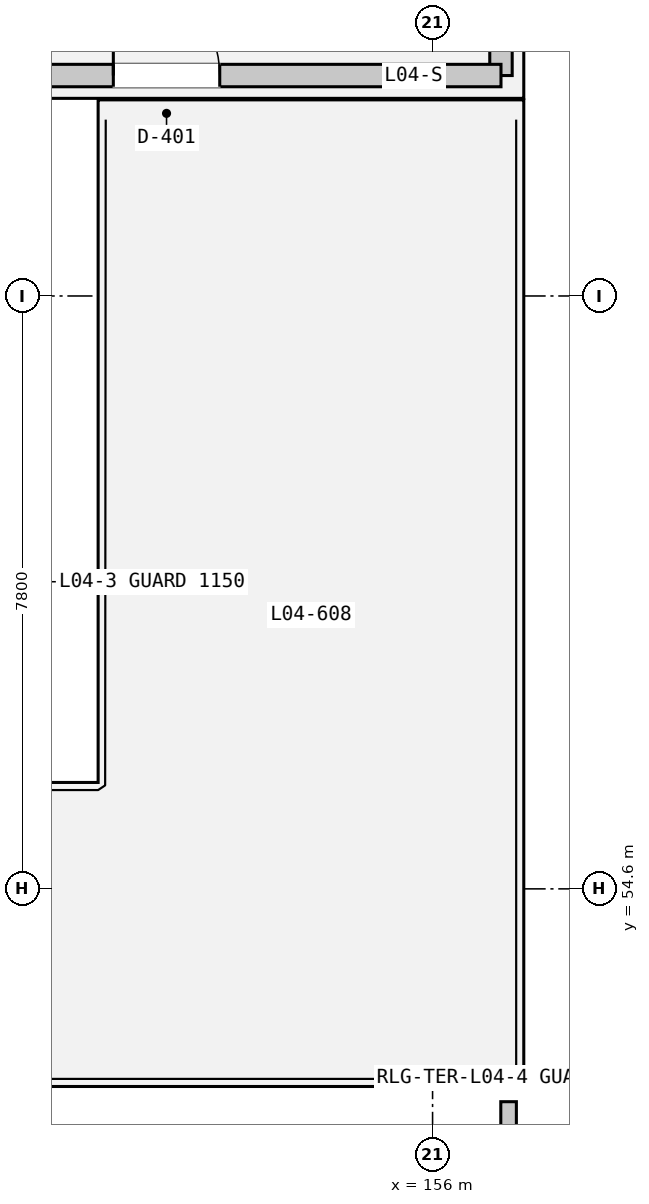
"""IFC4 building model, lengths in metres.
Left out: names, types, materials, properties, quantities, classifications, styles, units other than length and angle.
Written with IfcOpenShell. Run it as: python <this file> out.ifc"""

import sys

from ifc_helpers import new_model, si_unit, direction, frame, frame_2d, origin, place, context, subcontext, project, spatial, rectangle, extrude, element, fill, save


model = new_model("IFC4")
c1 = context("Model", 3, precision=1e-05, world=origin(), true_north=direction((0.0, 1.0)))
c2 = subcontext(c1, "Body", "Model", "MODEL_VIEW")
j1 = project(units=[si_unit("LENGTHUNIT", "METRE"), si_unit("PLANEANGLEUNIT", "RADIAN")], contexts=[c1])
p1 = place(None, origin())
s1 = spatial("IfcSite", under=j1, at=p1, CompositionType="ELEMENT")
p2 = place(p1, origin())
s2 = spatial("IfcBuilding", under=s1, at=p2, CompositionType="ELEMENT")
p3 = place(p2, frame((0.0, 0.0, 19.8)))
s3 = spatial("IfcBuildingStorey", under=s2, at=p3, CompositionType="ELEMENT", Elevation=19.8)
p4 = place(p3, frame((156.9, 65.3, 0.0), z_axis=(0.0, 0.0, 1.0), x_axis=(0.0, 1.0, 0.0)))
e1 = element("IfcWall", 1, at=p4, inside=s3, PredefinedType="SOLIDWALL", context=c2, shape_type="SweptSolid", body=[
    extrude(rectangle(XDim=35.8, YDim=0.295, at=frame_2d((17.9, 0.0))), origin(), (0.0, 0.0, 1.0), 3.57),
])
p5 = place(p4, frame((1.1, 0.0, 0.78)))
e2 = element("IfcOpeningElement", 2, at=p5, cuts=e1, PredefinedType="OPENING", context=c2, shape_type="SweptSolid", body=[
    extrude(rectangle(XDim=1.95, YDim=1.8, at=frame_2d((0.975, 0.9))), frame((0.0, 0.157, 0.0), z_axis=(0.0, -1.0, 0.0), x_axis=(1.0, 0.0, 0.0)), (0.0, 0.0, 1.0), 0.315),
])
p6 = place(p4, frame((5.0, 0.0, 0.78)))
e3 = element("IfcOpeningElement", 3, at=p6, cuts=e1, PredefinedType="OPENING", context=c2, shape_type="SweptSolid", body=[
    extrude(rectangle(XDim=1.95, YDim=1.8, at=frame_2d((0.975, 0.9))), frame((0.0, 0.157, 0.0), z_axis=(0.0, -1.0, 0.0), x_axis=(1.0, 0.0, 0.0)), (0.0, 0.0, 1.0), 0.315),
])
p7 = place(p4, frame((8.9, 0.0, 0.78)))
e4 = element("IfcOpeningElement", 4, at=p7, cuts=e1, PredefinedType="OPENING", context=c2, shape_type="SweptSolid", body=[
    extrude(rectangle(XDim=1.95, YDim=1.8, at=frame_2d((0.975, 0.9))), frame((0.0, 0.157, 0.0), z_axis=(0.0, -1.0, 0.0), x_axis=(1.0, 0.0, 0.0)), (0.0, 0.0, 1.0), 0.315),
])
p8 = place(p4, frame((12.8, 0.0, 0.78)))
e5 = element("IfcOpeningElement", 5, at=p8, cuts=e1, PredefinedType="OPENING", context=c2, shape_type="SweptSolid", body=[
    extrude(rectangle(XDim=1.95, YDim=1.8, at=frame_2d((0.975, 0.9))), frame((0.0, 0.157, 0.0), z_axis=(0.0, -1.0, 0.0), x_axis=(1.0, 0.0, 0.0)), (0.0, 0.0, 1.0), 0.315),
])
p9 = place(p4, frame((16.7, 0.0, 0.78)))
e6 = element("IfcOpeningElement", 6, at=p9, cuts=e1, PredefinedType="OPENING", context=c2, shape_type="SweptSolid", body=[
    extrude(rectangle(XDim=1.95, YDim=1.8, at=frame_2d((0.975, 0.9))), frame((0.0, 0.157, 0.0), z_axis=(0.0, -1.0, 0.0), x_axis=(1.0, 0.0, 0.0)), (0.0, 0.0, 1.0), 0.315),
])
p10 = place(p4, frame((24.5, 0.0, 0.78)))
e7 = element("IfcOpeningElement", 7, at=p10, cuts=e1, PredefinedType="OPENING", context=c2, shape_type="SweptSolid", body=[
    extrude(rectangle(XDim=1.95, YDim=1.8, at=frame_2d((0.975, 0.9))), frame((0.0, 0.157, 0.0), z_axis=(0.0, -1.0, 0.0), x_axis=(1.0, 0.0, 0.0)), (0.0, 0.0, 1.0), 0.315),
])
p11 = place(p3, frame((132.85, 65.3, 0.0), z_axis=(0.0, 0.0, 1.0), x_axis=(1.0, 0.0, 0.0)))
e8 = element("IfcWall", 8, at=p11, inside=s3, PredefinedType="SOLIDWALL", context=c2, shape_type="SweptSolid", body=[
    extrude(rectangle(XDim=24.05, YDim=0.295, at=frame_2d((12.025, 0.0))), origin(), (0.0, 0.0, 1.0), 3.57),
])
p12 = place(p11, frame((18.95, 0.0, 0.0)))
e9 = element("IfcOpeningElement", 9, at=p12, cuts=e8, PredefinedType="OPENING", context=c2, shape_type="SweptSolid", body=[
    extrude(rectangle(XDim=1.4, YDim=2.25, at=frame_2d((0.7, 1.125))), frame((0.0, 0.157, 0.0), z_axis=(0.0, -1.0, 0.0), x_axis=(1.0, 0.0, 0.0)), (0.0, 0.0, 1.0), 0.315),
])
p13 = place(p11, frame((1.1, 0.0, 0.78)))
e10 = element("IfcOpeningElement", 10, at=p13, cuts=e8, PredefinedType="OPENING", context=c2, shape_type="SweptSolid", body=[
    extrude(rectangle(XDim=1.4, YDim=1.4, at=frame_2d((0.7, 0.7))), frame((0.0, 0.157, 0.0), z_axis=(0.0, -1.0, 0.0), x_axis=(1.0, 0.0, 0.0)), (0.0, 0.0, 1.0), 0.315),
])
p14 = place(p11, frame((5.0, 0.0, 0.78)))
e11 = element("IfcOpeningElement", 11, at=p14, cuts=e8, PredefinedType="OPENING", context=c2, shape_type="SweptSolid", body=[
    extrude(rectangle(XDim=1.4, YDim=1.4, at=frame_2d((0.7, 0.7))), frame((0.0, 0.157, 0.0), z_axis=(0.0, -1.0, 0.0), x_axis=(1.0, 0.0, 0.0)), (0.0, 0.0, 1.0), 0.315),
])
p15 = place(p11, frame((8.9, 0.0, 0.78)))
e12 = element("IfcOpeningElement", 12, at=p15, cuts=e8, PredefinedType="OPENING", context=c2, shape_type="SweptSolid", body=[
    extrude(rectangle(XDim=1.4, YDim=1.4, at=frame_2d((0.7, 0.7))), frame((0.0, 0.157, 0.0), z_axis=(0.0, -1.0, 0.0), x_axis=(1.0, 0.0, 0.0)), (0.0, 0.0, 1.0), 0.315),
])
p16 = place(p11, frame((12.8, 0.0, 0.78)))
e13 = element("IfcOpeningElement", 13, at=p16, cuts=e8, PredefinedType="OPENING", context=c2, shape_type="SweptSolid", body=[
    extrude(rectangle(XDim=1.4, YDim=1.4, at=frame_2d((0.7, 0.7))), frame((0.0, 0.157, 0.0), z_axis=(0.0, -1.0, 0.0), x_axis=(1.0, 0.0, 0.0)), (0.0, 0.0, 1.0), 0.315),
])
p17 = place(p11, frame((16.7, 0.0, 0.78)))
e14 = element("IfcOpeningElement", 14, at=p17, cuts=e8, PredefinedType="OPENING", context=c2, shape_type="SweptSolid", body=[
    extrude(rectangle(XDim=1.4, YDim=1.4, at=frame_2d((0.7, 0.7))), frame((0.0, 0.157, 0.0), z_axis=(0.0, -1.0, 0.0), x_axis=(1.0, 0.0, 0.0)), (0.0, 0.0, 1.0), 0.315),
])
p18 = place(p3, frame((157.0, 19.3, 0.0), z_axis=(0.0, 0.0, 1.0), x_axis=(0.0, 1.0, 0.0)))
e15 = element("IfcWall", 15, at=p18, inside=s3, PredefinedType="PARAPET", context=c2, shape_type="SweptSolid", body=[
    extrude(rectangle(XDim=32.5, YDim=0.205, at=frame_2d((16.25, 0.0))), origin(), (0.0, 0.0, 1.0), 0.95),
])
p19 = place(p12, origin())
e16 = element("IfcDoor", 16, at=p19, inside=s3, OperationType="DOUBLE_DOOR_SINGLE_SWING", PredefinedType="DOOR", context=c2, shape_type="SweptSolid", body=[
    extrude(rectangle(XDim=1.4, YDim=2.25, at=frame_2d((0.7, 1.125))), frame((0.0, 0.025, 0.0), z_axis=(0.0, -1.0, 0.0), x_axis=(1.0, 0.0, 0.0)), (0.0, 0.0, 1.0), 0.05),
])
fill(e9, e16)
save(model, sys.argv[1])
